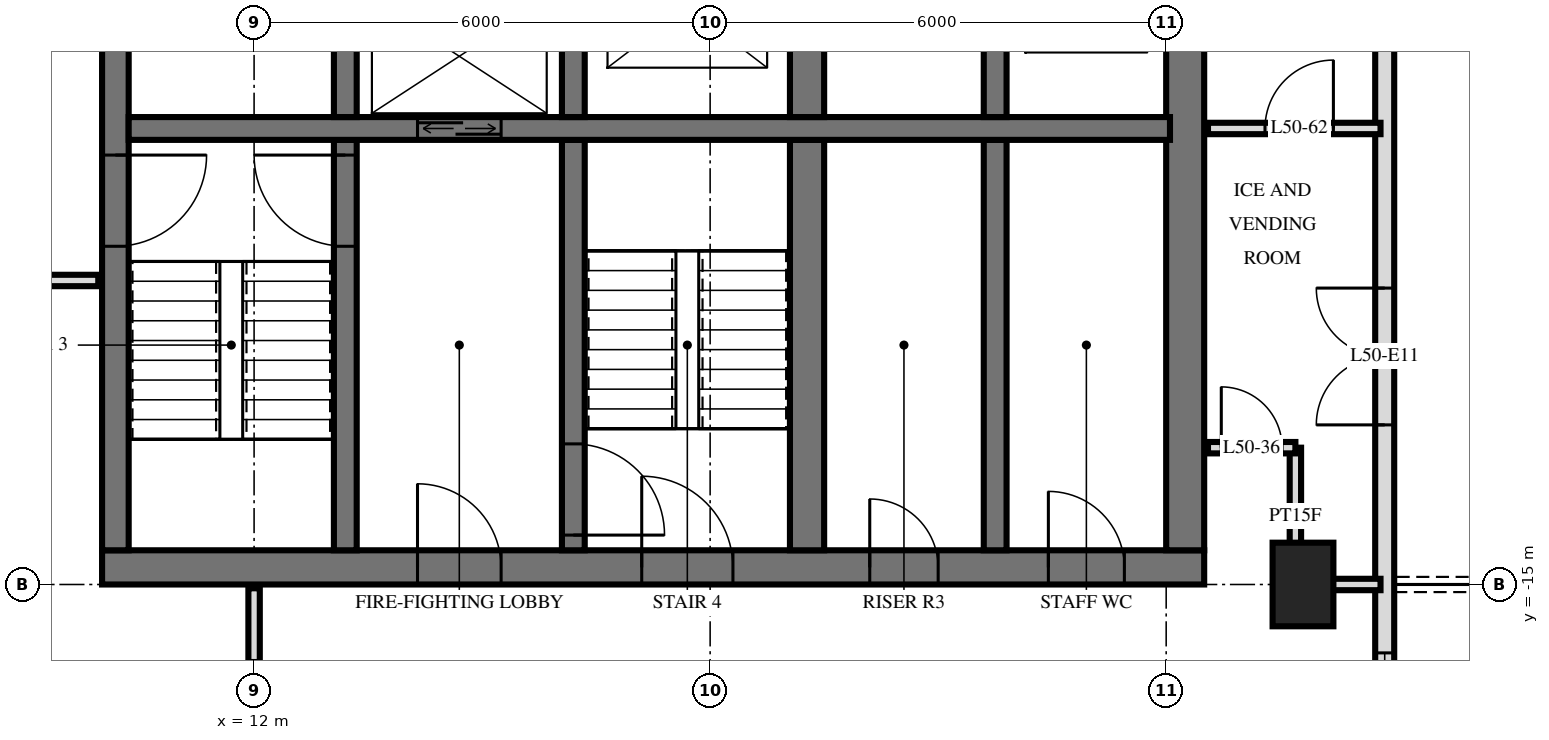
"""IFC4 building model, lengths in metres.
Left out: names, types, materials, properties, quantities, classifications, styles, units other than length and angle.
Written with IfcOpenShell. Run it as: python <this file> out.ifc"""

import sys

from ifc_helpers import new_model, si_unit, direction, frame, frame_2d, origin, origin_2d, place, context, subcontext, project, spatial, rectangle, extrude, element, fill, save


model = new_model("IFC4")
c1 = context("Model", 3, precision=1e-05, world=origin(), true_north=direction((0.0, 1.0)))
c2 = subcontext(c1, "Body", "Model", "MODEL_VIEW")
j1 = project(units=[si_unit("LENGTHUNIT", "METRE"), si_unit("PLANEANGLEUNIT", "RADIAN")], contexts=[c1])
p1 = place(None, origin())
s1 = spatial("IfcSite", under=j1, at=p1, CompositionType="ELEMENT")
p2 = place(p1, origin())
s2 = spatial("IfcBuilding", under=s1, at=p2, CompositionType="ELEMENT")
p3 = place(p2, frame((0.0, 0.0, 194.1)))
s3 = spatial("IfcBuildingStorey", under=s2, at=p3, CompositionType="ELEMENT", Elevation=194.1)
p4 = place(p3, frame((25.8, -15.0, 0.0), z_axis=(0.0, 0.0, 1.0), x_axis=(0.0, 1.0, 0.0)))
e1 = element("IfcColumn", 1, at=p4, inside=s3, PredefinedType="COLUMN", context=c2, shape_type="SweptSolid", body=[
    extrude(rectangle(XDim=1.1, YDim=0.8, at=origin_2d()), origin(), (0.0, 0.0, 1.0), 3.5),
])
p5 = place(p3, frame((10.0, -14.775, 0.0), z_axis=(0.0, 0.0, 1.0), x_axis=(1.0, 0.0, 0.0)))
e2 = element("IfcWall", 2, at=p5, inside=s3, PredefinedType="SHEAR", context=c2, shape_type="SweptSolid", body=[
    extrude(rectangle(XDim=14.5, YDim=0.45, at=frame_2d((7.25, 0.0))), origin(), (0.0, 0.0, 1.0), 3.5),
])
p6 = place(p5, frame((7.1, 0.0, 0.0)))
e3 = element("IfcOpeningElement", 3, at=p6, cuts=e2, PredefinedType="OPENING", context=c2, shape_type="SweptSolid", body=[
    extrude(rectangle(XDim=1.2, YDim=2.1, at=frame_2d((0.6, 1.05))), frame((0.0, 0.235, 0.0), z_axis=(0.0, -1.0, 0.0), x_axis=(1.0, 0.0, 0.0)), (0.0, 0.0, 1.0), 0.47),
])
p7 = place(p5, frame((4.15, 0.0, 0.0)))
e4 = element("IfcOpeningElement", 4, at=p7, cuts=e2, PredefinedType="OPENING", context=c2, shape_type="SweptSolid", body=[
    extrude(rectangle(XDim=1.1, YDim=2.1, at=frame_2d((0.55, 1.05))), frame((0.0, 0.235, 0.0), z_axis=(0.0, -1.0, 0.0), x_axis=(1.0, 0.0, 0.0)), (0.0, 0.0, 1.0), 0.47),
])
p8 = place(p5, frame((10.1, 0.0, 0.0)))
e5 = element("IfcOpeningElement", 5, at=p8, cuts=e2, PredefinedType="OPENING", context=c2, shape_type="SweptSolid", body=[
    extrude(rectangle(XDim=0.9, YDim=2.1, at=frame_2d((0.45, 1.05))), frame((0.0, 0.235, 0.0), z_axis=(0.0, -1.0, 0.0), x_axis=(1.0, 0.0, 0.0)), (0.0, 0.0, 1.0), 0.47),
])
p9 = place(p5, frame((12.45, 0.0, 0.0)))
e6 = element("IfcOpeningElement", 6, at=p9, cuts=e2, PredefinedType="OPENING", context=c2, shape_type="SweptSolid", body=[
    extrude(rectangle(XDim=1.0, YDim=2.1, at=frame_2d((0.5, 1.05))), frame((0.0, 0.235, 0.0), z_axis=(0.0, -1.0, 0.0), x_axis=(1.0, 0.0, 0.0)), (0.0, 0.0, 1.0), 0.47),
])
p10 = place(p3, frame((10.175, -14.55, 0.0), z_axis=(0.0, 0.0, 1.0), x_axis=(0.0, 1.0, 0.0)))
e7 = element("IfcWall", 7, at=p10, inside=s3, PredefinedType="SHEAR", context=c2, shape_type="SweptSolid", body=[
    extrude(rectangle(XDim=14.1, YDim=0.35, at=frame_2d((7.05, 0.0))), origin(), (0.0, 0.0, 1.0), 3.5),
])
p11 = place(p10, frame((8.4, 0.0, 0.0)))
e8 = element("IfcOpeningElement", 8, at=p11, cuts=e7, PredefinedType="OPENING", context=c2, shape_type="SweptSolid", body=[
    extrude(rectangle(XDim=1.4, YDim=2.4, at=frame_2d((0.7, 1.2))), frame((0.0, 0.185, 0.0), z_axis=(0.0, -1.0, 0.0), x_axis=(1.0, 0.0, 0.0)), (0.0, 0.0, 1.0), 0.37),
])
p12 = place(p10, frame((10.0, 0.0, 0.0)))
e9 = element("IfcOpeningElement", 9, at=p12, cuts=e7, PredefinedType="OPENING", context=c2, shape_type="SweptSolid", body=[
    extrude(rectangle(XDim=1.4, YDim=2.4, at=frame_2d((0.7, 1.2))), frame((0.0, 0.185, 0.0), z_axis=(0.0, -1.0, 0.0), x_axis=(1.0, 0.0, 0.0)), (0.0, 0.0, 1.0), 0.37),
])
p13 = place(p10, frame((4.0, 0.0, 0.0)))
e10 = element("IfcOpeningElement", 10, at=p13, cuts=e7, PredefinedType="OPENING", context=c2, shape_type="SweptSolid", body=[
    extrude(rectangle(XDim=1.2, YDim=2.1, at=frame_2d((0.6, 1.05))), frame((0.0, 0.185, 0.0), z_axis=(0.0, -1.0, 0.0), x_axis=(1.0, 0.0, 0.0)), (0.0, 0.0, 1.0), 0.37),
])
p14 = place(p3, frame((24.25, -14.55, 0.0), z_axis=(0.0, 0.0, 1.0), x_axis=(0.0, 1.0, 0.0)))
e11 = element("IfcWall", 11, at=p14, inside=s3, PredefinedType="SHEAR", context=c2, shape_type="SweptSolid", body=[
    extrude(rectangle(XDim=14.1, YDim=0.5, at=frame_2d((7.05, 0.0))), origin(), (0.0, 0.0, 1.0), 3.5),
])
p15 = place(p3, frame((10.35, -9.0, 0.0), z_axis=(0.0, 0.0, 1.0), x_axis=(1.0, 0.0, 0.0)))
e12 = element("IfcWall", 12, at=p15, inside=s3, PredefinedType="SHEAR", context=c2, shape_type="SweptSolid", body=[
    extrude(rectangle(XDim=13.7, YDim=0.3, at=frame_2d((6.85, 0.0))), origin(), (0.0, 0.0, 1.0), 3.5),
])
p16 = place(p15, frame((3.8, 0.0, 0.0)))
e13 = element("IfcOpeningElement", 13, at=p16, cuts=e12, PredefinedType="OPENING", context=c2, shape_type="SweptSolid", body=[
    extrude(rectangle(XDim=1.1, YDim=2.1, at=frame_2d((0.55, 1.05))), frame((0.0, 0.16, 0.0), z_axis=(0.0, -1.0, 0.0), x_axis=(1.0, 0.0, 0.0)), (0.0, 0.0, 1.0), 0.32),
])
p17 = place(p3, frame((13.2, -8.85, 0.0), z_axis=(0.0, 0.0, 1.0), x_axis=(0.0, 1.0, 0.0)))
e14 = element("IfcWall", 14, at=p17, inside=s3, PredefinedType="SHEAR", context=c2, shape_type="SweptSolid", body=[
    extrude(rectangle(XDim=2.3, YDim=0.3, at=frame_2d((1.15, 0.0))), origin(), (0.0, 0.0, 1.0), 3.5),
])
p18 = place(p3, frame((13.2, -14.55, 0.0), z_axis=(0.0, 0.0, 1.0), x_axis=(0.0, 1.0, 0.0)))
e15 = element("IfcWall", 15, at=p18, inside=s3, PredefinedType="SHEAR", context=c2, shape_type="SweptSolid", body=[
    extrude(rectangle(XDim=5.4, YDim=0.3, at=frame_2d((2.7, 0.0))), origin(), (0.0, 0.0, 1.0), 3.5),
])
p19 = place(p18, frame((4.0, 0.0, 0.0)))
e16 = element("IfcOpeningElement", 16, at=p19, cuts=e15, PredefinedType="OPENING", context=c2, shape_type="SweptSolid", body=[
    extrude(rectangle(XDim=1.2, YDim=2.1, at=frame_2d((0.6, 1.05))), frame((0.0, 0.16, 0.0), z_axis=(0.0, -1.0, 0.0), x_axis=(1.0, 0.0, 0.0)), (0.0, 0.0, 1.0), 0.32),
])
p20 = place(p3, frame((16.2, -8.85, 0.0), z_axis=(0.0, 0.0, 1.0), x_axis=(0.0, 1.0, 0.0)))
e17 = element("IfcWall", 17, at=p20, inside=s3, PredefinedType="SHEAR", context=c2, shape_type="SweptSolid", body=[
    extrude(rectangle(XDim=2.3, YDim=0.3, at=frame_2d((1.15, 0.0))), origin(), (0.0, 0.0, 1.0), 3.5),
])
p21 = place(p3, frame((16.2, -14.55, 0.0), z_axis=(0.0, 0.0, 1.0), x_axis=(0.0, 1.0, 0.0)))
e18 = element("IfcWall", 18, at=p21, inside=s3, PredefinedType="SHEAR", context=c2, shape_type="SweptSolid", body=[
    extrude(rectangle(XDim=5.4, YDim=0.3, at=frame_2d((2.7, 0.0))), origin(), (0.0, 0.0, 1.0), 3.5),
])
p22 = place(p21, frame((0.2, 0.0, 0.0)))
e19 = element("IfcOpeningElement", 19, at=p22, cuts=e18, PredefinedType="OPENING", context=c2, shape_type="SweptSolid", body=[
    extrude(rectangle(XDim=1.2, YDim=2.1, at=frame_2d((0.6, 1.05))), frame((0.0, 0.16, 0.0), z_axis=(0.0, -1.0, 0.0), x_axis=(1.0, 0.0, 0.0)), (0.0, 0.0, 1.0), 0.32),
])
p23 = place(p3, frame((19.275, -8.85, 0.0), z_axis=(0.0, 0.0, 1.0), x_axis=(0.0, 1.0, 0.0)))
e20 = element("IfcWall", 20, at=p23, inside=s3, PredefinedType="SHEAR", context=c2, shape_type="SweptSolid", body=[
    extrude(rectangle(XDim=2.3, YDim=0.45, at=frame_2d((1.15, 0.0))), origin(), (0.0, 0.0, 1.0), 3.5),
])
p24 = place(p3, frame((19.275, -14.55, 0.0), z_axis=(0.0, 0.0, 1.0), x_axis=(0.0, 1.0, 0.0)))
e21 = element("IfcWall", 21, at=p24, inside=s3, PredefinedType="SHEAR", context=c2, shape_type="SweptSolid", body=[
    extrude(rectangle(XDim=5.4, YDim=0.45, at=frame_2d((2.7, 0.0))), origin(), (0.0, 0.0, 1.0), 3.5),
])
p25 = place(p3, frame((21.75, -8.85, 0.0), z_axis=(0.0, 0.0, 1.0), x_axis=(0.0, 1.0, 0.0)))
e22 = element("IfcWall", 22, at=p25, inside=s3, PredefinedType="SHEAR", context=c2, shape_type="SweptSolid", body=[
    extrude(rectangle(XDim=2.3, YDim=0.3, at=frame_2d((1.15, 0.0))), origin(), (0.0, 0.0, 1.0), 3.5),
])
p26 = place(p3, frame((21.75, -14.55, 0.0), z_axis=(0.0, 0.0, 1.0), x_axis=(0.0, 1.0, 0.0)))
e23 = element("IfcWall", 23, at=p26, inside=s3, PredefinedType="SHEAR", context=c2, shape_type="SweptSolid", body=[
    extrude(rectangle(XDim=5.4, YDim=0.3, at=frame_2d((2.7, 0.0))), origin(), (0.0, 0.0, 1.0), 3.5),
])
p27 = place(p3, frame((26.875, -24.875, 0.0), z_axis=(0.0, 0.0, 1.0), x_axis=(0.0, 1.0, 0.0)))
e24 = element("IfcWall", 24, at=p27, inside=s3, PredefinedType="SOLIDWALL", context=c2, shape_type="SweptSolid", body=[
    extrude(rectangle(XDim=21.551, YDim=0.25, at=frame_2d((10.775, 0.0))), origin(), (0.0, 0.0, 1.0), 3.22),
])
p28 = place(p27, frame((0.425, 0.0, 0.0)))
e25 = element("IfcOpeningElement", 25, at=p28, cuts=e24, PredefinedType="OPENING", context=c2, shape_type="SweptSolid", body=[
    extrude(rectangle(XDim=1.8, YDim=2.4, at=frame_2d((0.9, 1.2))), frame((0.0, 0.135, 0.0), z_axis=(0.0, -1.0, 0.0), x_axis=(1.0, 0.0, 0.0)), (0.0, 0.0, 1.0), 0.27),
])
p29 = place(p27, frame((3.875, 0.0, 0.0)))
e26 = element("IfcOpeningElement", 26, at=p29, cuts=e24, PredefinedType="OPENING", context=c2, shape_type="SweptSolid", body=[
    extrude(rectangle(XDim=1.8, YDim=2.4, at=frame_2d((0.9, 1.2))), frame((0.0, 0.135, 0.0), z_axis=(0.0, -1.0, 0.0), x_axis=(1.0, 0.0, 0.0)), (0.0, 0.0, 1.0), 0.27),
])
p30 = place(p27, frame((7.775, 0.0, 0.9)))
e27 = element("IfcOpeningElement", 27, at=p30, cuts=e24, PredefinedType="OPENING", context=c2, shape_type="SweptSolid", body=[
    extrude(rectangle(XDim=1.2, YDim=1.5, at=frame_2d((0.6, 0.75))), frame((0.0, 0.135, 0.0), z_axis=(0.0, -1.0, 0.0), x_axis=(1.0, 0.0, 0.0)), (0.0, 0.0, 1.0), 0.27),
])
p31 = place(p27, frame((11.975, 0.0, 0.0)))
e28 = element("IfcOpeningElement", 28, at=p31, cuts=e24, PredefinedType="OPENING", context=c2, shape_type="SweptSolid", body=[
    extrude(rectangle(XDim=1.8, YDim=2.4, at=frame_2d((0.9, 1.2))), frame((0.0, 0.135, 0.0), z_axis=(0.0, -1.0, 0.0), x_axis=(1.0, 0.0, 0.0)), (0.0, 0.0, 1.0), 0.27),
])
p32 = place(p3, frame((25.7, -15.0, 0.0), z_axis=(0.0, 0.0, 1.0), x_axis=(0.0, 1.0, 0.0)))
e29 = element("IfcWall", 29, at=p32, inside=s3, PredefinedType="PARTITIONING", context=c2, shape_type="SweptSolid", body=[
    extrude(rectangle(XDim=1.8, YDim=0.15, at=frame_2d((0.9, 0.0))), origin(), (0.0, 0.0, 1.0), 3.22),
])
p33 = place(p3, frame((12.0, -18.0, 0.0), z_axis=(0.0, 0.0, 1.0), x_axis=(0.0, 1.0, 0.0)))
e30 = element("IfcWall", 30, at=p33, inside=s3, PredefinedType="PARTITIONING", context=c2, shape_type="SweptSolid", body=[
    extrude(rectangle(XDim=2.95, YDim=0.15, at=frame_2d((1.475, 0.0))), origin(), (0.0, 0.0, 1.0), 3.22),
])
p34 = place(p33, frame((1.0, 0.0, 0.0)))
e31 = element("IfcOpeningElement", 31, at=p34, cuts=e30, PredefinedType="OPENING", context=c2, shape_type="SweptSolid", body=[
    extrude(rectangle(XDim=1.0, YDim=2.1, at=frame_2d((0.5, 1.05))), frame((0.0, 0.085, 0.0), z_axis=(0.0, -1.0, 0.0), x_axis=(1.0, 0.0, 0.0)), (0.0, 0.0, 1.0), 0.17),
])
p35 = place(p3, frame((25.7, -15.0, 0.0), z_axis=(0.0, 0.0, 1.0), x_axis=(1.0, 0.0, 0.0)))
e32 = element("IfcWall", 32, at=p35, inside=s3, PredefinedType="PARTITIONING", context=c2, shape_type="SweptSolid", body=[
    extrude(rectangle(XDim=1.12, YDim=0.15, at=frame_2d((0.56, 0.0))), origin(), (0.0, 0.0, 1.0), 3.22),
])
p36 = place(p3, frame((24.55, -13.2, 0.0), z_axis=(0.0, 0.0, 1.0), x_axis=(1.0, 0.0, 0.0)))
e33 = element("IfcWall", 33, at=p36, inside=s3, PredefinedType="PARTITIONING", context=c2, shape_type="SweptSolid", body=[
    extrude(rectangle(XDim=1.15, YDim=0.15, at=frame_2d((0.575, 0.0))), origin(), (0.0, 0.0, 1.0), 3.22),
])
p37 = place(p36, frame((0.175, 0.0, 0.0)))
e34 = element("IfcOpeningElement", 34, at=p37, cuts=e33, PredefinedType="OPENING", context=c2, shape_type="SweptSolid", body=[
    extrude(rectangle(XDim=0.8, YDim=2.1, at=frame_2d((0.4, 1.05))), frame((0.0, 0.085, 0.0), z_axis=(0.0, -1.0, 0.0), x_axis=(1.0, 0.0, 0.0)), (0.0, 0.0, 1.0), 0.17),
])
p38 = place(p3, frame((-9.95, -11.0, 0.0), z_axis=(0.0, 0.0, 1.0), x_axis=(1.0, 0.0, 0.0)))
e35 = element("IfcWall", 35, at=p38, inside=s3, PredefinedType="PARTITIONING", context=c2, shape_type="SweptSolid", body=[
    extrude(rectangle(XDim=19.9, YDim=0.15, at=frame_2d((9.95, 0.0))), origin(), (0.0, 0.0, 1.0), 3.22),
])
p39 = place(p38, frame((9.45, 0.0, 0.0)))
e36 = element("IfcOpeningElement", 36, at=p39, cuts=e35, PredefinedType="OPENING", context=c2, shape_type="SweptSolid", body=[
    extrude(rectangle(XDim=1.0, YDim=2.1, at=frame_2d((0.5, 1.05))), frame((0.0, 0.085, 0.0), z_axis=(0.0, -1.0, 0.0), x_axis=(1.0, 0.0, 0.0)), (0.0, 0.0, 1.0), 0.17),
])
p40 = place(p38, frame((3.45, 0.0, 0.0)))
e37 = element("IfcOpeningElement", 37, at=p40, cuts=e35, PredefinedType="OPENING", context=c2, shape_type="SweptSolid", body=[
    extrude(rectangle(XDim=1.0, YDim=2.1, at=frame_2d((0.5, 1.05))), frame((0.0, 0.085, 0.0), z_axis=(0.0, -1.0, 0.0), x_axis=(1.0, 0.0, 0.0)), (0.0, 0.0, 1.0), 0.17),
])
p41 = place(p3, frame((24.55, -9.0, 0.0), z_axis=(0.0, 0.0, 1.0), x_axis=(1.0, 0.0, 0.0)))
e38 = element("IfcWall", 38, at=p41, inside=s3, PredefinedType="PARTITIONING", context=c2, shape_type="SweptSolid", body=[
    extrude(rectangle(XDim=2.27, YDim=0.15, at=frame_2d((1.135, 0.0))), origin(), (0.0, 0.0, 1.0), 3.22),
])
p42 = place(p41, frame((0.75, 0.0, 0.0)))
e39 = element("IfcOpeningElement", 39, at=p42, cuts=e38, PredefinedType="OPENING", context=c2, shape_type="SweptSolid", body=[
    extrude(rectangle(XDim=0.9, YDim=2.1, at=frame_2d((0.45, 1.05))), frame((0.0, 0.085, 0.0), z_axis=(0.0, -1.0, 0.0), x_axis=(1.0, 0.0, 0.0)), (0.0, 0.0, 1.0), 0.17),
])
p43 = place(p30, origin())
e40 = element("IfcWindow", 40, at=p43, inside=s3, PartitioningType="SINGLE_PANEL", PredefinedType="WINDOW", context=c2, shape_type="SweptSolid", body=[
    extrude(rectangle(XDim=1.2, YDim=1.5, at=frame_2d((0.6, 0.75))), frame((0.0, 0.03, 0.0), z_axis=(0.0, -1.0, 0.0), x_axis=(1.0, 0.0, 0.0)), (0.0, 0.0, 1.0), 0.06),
])
fill(e27, e40)
p44 = place(p31, origin())
e41 = element("IfcDoor", 41, at=p44, inside=s3, OperationType="DOUBLE_DOOR_SINGLE_SWING", PredefinedType="DOOR", context=c2, shape_type="SweptSolid", body=[
    extrude(rectangle(XDim=1.8, YDim=2.4, at=frame_2d((0.9, 1.2))), frame((0.0, 0.025, 0.0), z_axis=(0.0, -1.0, 0.0), x_axis=(1.0, 0.0, 0.0)), (0.0, 0.0, 1.0), 0.05),
])
fill(e28, e41)
p45 = place(p16, origin())
e42 = element("IfcDoor", 42, at=p45, inside=s3, OperationType="DOUBLE_DOOR_SLIDING", PredefinedType="USERDEFINED", context=c2, shape_type="SweptSolid", body=[
    extrude(rectangle(XDim=1.1, YDim=2.1, at=frame_2d((0.55, 1.05))), frame((0.0, 0.025, 0.0), z_axis=(0.0, -1.0, 0.0), x_axis=(1.0, 0.0, 0.0)), (0.0, 0.0, 1.0), 0.05),
])
fill(e13, e42)
p46 = place(p13, frame((0.6, 0.0, 0.0), z_axis=(0.0, 0.0, 1.0), x_axis=(-1.0, 0.0, 0.0)))
e43 = element("IfcDoor", 43, at=p46, inside=s3, OperationType="SINGLE_SWING_RIGHT", PredefinedType="DOOR", context=c2, shape_type="SweptSolid", body=[
    extrude(rectangle(XDim=1.2, YDim=2.1, at=frame_2d((0.0, 1.05))), frame((0.0, -0.025, 0.0), z_axis=(0.0, 1.0, 0.0), x_axis=(-1.0, 0.0, 0.0)), (0.0, 0.0, 1.0), 0.05),
])
fill(e10, e43)
p47 = place(p6, origin())
e44 = element("IfcDoor", 44, at=p47, inside=s3, OperationType="SINGLE_SWING_RIGHT", PredefinedType="DOOR", context=c2, shape_type="SweptSolid", body=[
    extrude(rectangle(XDim=1.2, YDim=2.1, at=frame_2d((0.6, 1.05))), frame((0.0, 0.025, 0.0), z_axis=(0.0, -1.0, 0.0), x_axis=(1.0, 0.0, 0.0)), (0.0, 0.0, 1.0), 0.05),
])
fill(e3, e44)
p48 = place(p7, origin())
e45 = element("IfcDoor", 45, at=p48, inside=s3, OperationType="SINGLE_SWING_RIGHT", PredefinedType="DOOR", context=c2, shape_type="SweptSolid", body=[
    extrude(rectangle(XDim=1.1, YDim=2.1, at=frame_2d((0.55, 1.05))), frame((0.0, 0.025, 0.0), z_axis=(0.0, -1.0, 0.0), x_axis=(1.0, 0.0, 0.0)), (0.0, 0.0, 1.0), 0.05),
])
fill(e4, e45)
p49 = place(p8, origin())
e46 = element("IfcDoor", 46, at=p49, inside=s3, OperationType="SINGLE_SWING_RIGHT", PredefinedType="DOOR", context=c2, shape_type="SweptSolid", body=[
    extrude(rectangle(XDim=0.9, YDim=2.1, at=frame_2d((0.45, 1.05))), frame((0.0, 0.025, 0.0), z_axis=(0.0, -1.0, 0.0), x_axis=(1.0, 0.0, 0.0)), (0.0, 0.0, 1.0), 0.05),
])
fill(e5, e46)
p50 = place(p9, origin())
e47 = element("IfcDoor", 47, at=p50, inside=s3, OperationType="SINGLE_SWING_RIGHT", PredefinedType="DOOR", context=c2, shape_type="SweptSolid", body=[
    extrude(rectangle(XDim=1.0, YDim=2.1, at=frame_2d((0.5, 1.05))), frame((0.0, 0.025, 0.0), z_axis=(0.0, -1.0, 0.0), x_axis=(1.0, 0.0, 0.0)), (0.0, 0.0, 1.0), 0.05),
])
fill(e6, e47)
p51 = place(p19, origin())
e48 = element("IfcDoor", 48, at=p51, inside=s3, OperationType="SINGLE_SWING_LEFT", PredefinedType="DOOR", context=c2, shape_type="SweptSolid", body=[
    extrude(rectangle(XDim=1.2, YDim=2.1, at=frame_2d((0.6, 1.05))), frame((0.0, 0.025, 0.0), z_axis=(0.0, -1.0, 0.0), x_axis=(1.0, 0.0, 0.0)), (0.0, 0.0, 1.0), 0.05),
])
fill(e16, e48)
p52 = place(p22, frame((0.6, 0.0, 0.0), z_axis=(0.0, 0.0, 1.0), x_axis=(-1.0, 0.0, 0.0)))
e49 = element("IfcDoor", 49, at=p52, inside=s3, OperationType="SINGLE_SWING_LEFT", PredefinedType="DOOR", context=c2, shape_type="SweptSolid", body=[
    extrude(rectangle(XDim=1.2, YDim=2.1, at=frame_2d((0.0, 1.05))), frame((0.0, -0.025, 0.0), z_axis=(0.0, 1.0, 0.0), x_axis=(-1.0, 0.0, 0.0)), (0.0, 0.0, 1.0), 0.05),
])
fill(e19, e49)
p53 = place(p37, origin())
e50 = element("IfcDoor", 50, at=p53, inside=s3, OperationType="SINGLE_SWING_RIGHT", PredefinedType="DOOR", context=c2, shape_type="SweptSolid", body=[
    extrude(rectangle(XDim=0.8, YDim=2.1, at=frame_2d((0.4, 1.05))), frame((0.0, 0.025, 0.0), z_axis=(0.0, -1.0, 0.0), x_axis=(1.0, 0.0, 0.0)), (0.0, 0.0, 1.0), 0.05),
])
fill(e34, e50)
p54 = place(p42, origin())
e51 = element("IfcDoor", 51, at=p54, inside=s3, OperationType="SINGLE_SWING_LEFT", PredefinedType="DOOR", context=c2, shape_type="SweptSolid", body=[
    extrude(rectangle(XDim=0.9, YDim=2.1, at=frame_2d((0.45, 1.05))), frame((0.0, 0.025, 0.0), z_axis=(0.0, -1.0, 0.0), x_axis=(1.0, 0.0, 0.0)), (0.0, 0.0, 1.0), 0.05),
])
fill(e39, e51)
save(model, sys.argv[1])
